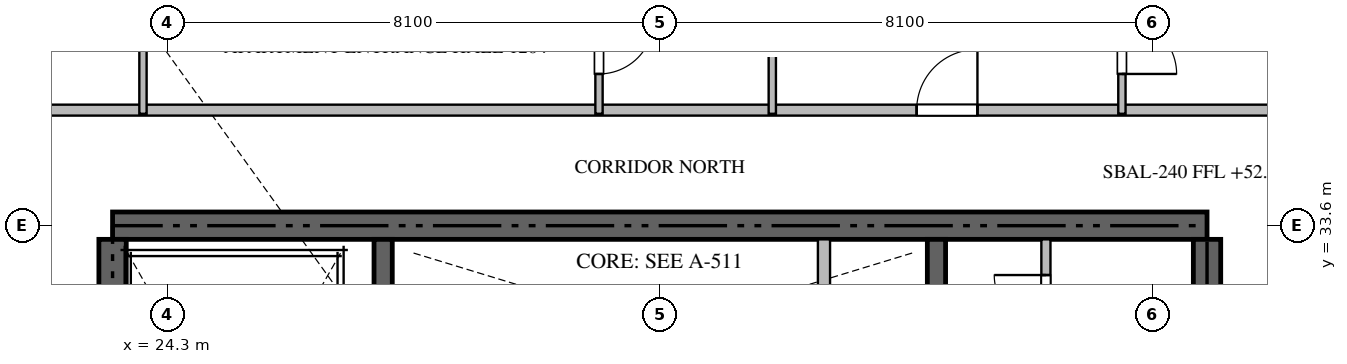
"""IFC4 building model, lengths in metres.
Left out: names, types, materials, properties, quantities, classifications, styles, units other than length and angle.
Written with IfcOpenShell. Run it as: python <this file> out.ifc"""

import sys

from ifc_helpers import new_model, si_unit, direction, frame, frame_2d, origin, place, context, subcontext, project, spatial, rectangle, extrude, source, transform, mapped, element, fill, save


model = new_model("IFC4")
c1 = context("Model", 3, precision=1e-05, world=origin(), true_north=direction((0.0, 1.0)))
c2 = subcontext(c1, "Body", "Model", "MODEL_VIEW")
j1 = project(units=[si_unit("LENGTHUNIT", "METRE"), si_unit("PLANEANGLEUNIT", "RADIAN")], contexts=[c1])
p1 = place(None, origin())
s1 = spatial("IfcSite", under=j1, at=p1, CompositionType="ELEMENT")
p2 = place(p1, origin())
s2 = spatial("IfcBuilding", under=s1, at=p2, CompositionType="ELEMENT")
p3 = place(p2, frame((0.0, 0.0, 52.95)))
s3 = spatial("IfcBuildingStorey", under=s2, at=p3, CompositionType="ELEMENT", Elevation=52.95)
p4 = place(p3, frame((41.4, 33.6, -0.26), z_axis=(0.0, 0.0, 1.0), x_axis=(-1.0, 0.0, 0.0)))
e1 = element("IfcWall", 1, at=p4, inside=s3, PredefinedType="SHEAR", context=c2, shape_type="SweptSolid", body=[
    extrude(rectangle(XDim=18.0, YDim=0.45, at=frame_2d((9.0, 0.0))), origin(), (0.0, 0.0, 1.0), 3.748),
])
p5 = place(p3, frame((23.4, 24.25, -0.26), z_axis=(0.0, 0.0, 1.0), x_axis=(0.0, 1.0, 0.0)))
e2 = element("IfcWall", 2, at=p5, inside=s3, PredefinedType="SHEAR", context=c2, shape_type="SweptSolid", body=[
    extrude(rectangle(XDim=9.125, YDim=0.45, at=frame_2d((4.562, 0.0))), origin(), (0.0, 0.0, 1.0), 3.748),
])
p6 = place(p3, frame((41.4, 27.75, -0.26), z_axis=(0.0, 0.0, 1.0), x_axis=(0.0, 1.0, 0.0)))
e3 = element("IfcWall", 3, at=p6, inside=s3, PredefinedType="SHEAR", context=c2, shape_type="SweptSolid", body=[
    extrude(rectangle(XDim=5.625, YDim=0.45, at=frame_2d((2.812, 0.0))), origin(), (0.0, 0.0, 1.0), 3.748),
])
p7 = place(p3, frame((27.85, 23.55, -0.26), z_axis=(0.0, 0.0, 1.0), x_axis=(0.0, 1.0, 0.0)))
e4 = element("IfcWall", 4, at=p7, inside=s3, PredefinedType="SHEAR", context=c2, shape_type="SweptSolid", body=[
    extrude(rectangle(XDim=9.825, YDim=0.3, at=frame_2d((4.913, 0.0))), origin(), (0.0, 0.0, 1.0), 3.748),
])
p8 = place(p3, frame((36.95, 27.05, -0.26), z_axis=(0.0, 0.0, 1.0), x_axis=(0.0, 1.0, 0.0)))
e5 = element("IfcWall", 5, at=p8, inside=s3, PredefinedType="SHEAR", context=c2, shape_type="SweptSolid", body=[
    extrude(rectangle(XDim=6.325, YDim=0.3, at=frame_2d((3.163, 0.0))), origin(), (0.0, 0.0, 1.0), 3.748),
])
p9 = place(p3, frame((35.1, 30.75, 0.0), z_axis=(0.0, 0.0, 1.0), x_axis=(0.0, 1.0, 0.0)))
e6 = element("IfcWall", 6, at=p9, inside=s3, PredefinedType="STANDARD", context=c2, shape_type="SweptSolid", body=[
    extrude(rectangle(XDim=2.625, YDim=0.2, at=frame_2d((1.312, 0.0))), origin(), (0.0, 0.0, 1.0), 3.49),
])
p10 = place(p3, frame((38.75, 31.352, 0.0), z_axis=(0.0, 0.0, 1.0), x_axis=(0.0, 1.0, 0.0)))
e7 = element("IfcWall", 7, at=p10, inside=s3, PredefinedType="PARTITIONING", context=c2, shape_type="SweptSolid", body=[
    extrude(rectangle(XDim=2.023, YDim=0.15, at=frame_2d((1.011, 0.0))), origin(), (0.0, 0.0, 1.0), 3.49),
])
p11 = place(p10, frame((0.586, 0.0, 0.0)))
e8 = element("IfcOpeningElement", 8, at=p11, cuts=e7, PredefinedType="OPENING", context=c2, shape_type="SweptSolid", body=[
    extrude(rectangle(XDim=0.85, YDim=2.1, at=frame_2d((0.425, 1.05))), frame((0.0, 0.085, 0.0), z_axis=(0.0, -1.0, 0.0), x_axis=(1.0, 0.0, 0.0)), (0.0, 0.0, 1.0), 0.17),
])
p12 = place(p3, frame((21.402, 35.5, 0.0), z_axis=(0.0, 0.0, 1.0), x_axis=(1.0, 0.0, 0.0)))
e9 = element("IfcWall", 9, at=p12, inside=s3, PredefinedType="PARTITIONING", context=c2, shape_type="SweptSolid", body=[
    extrude(rectangle(XDim=21.996, YDim=0.18, at=frame_2d((10.998, 0.0))), origin(), (0.0, 0.0, 1.0), 3.49),
])
p13 = place(p12, frame((15.222, 0.0, 0.0)))
e10 = element("IfcOpeningElement", 10, at=p13, cuts=e9, PredefinedType="OPENING", context=c2, shape_type="SweptSolid", body=[
    extrude(rectangle(XDim=1.0, YDim=2.15, at=frame_2d((0.5, 1.075))), frame((0.0, 0.1, 0.0), z_axis=(0.0, -1.0, 0.0), x_axis=(1.0, 0.0, 0.0)), (0.0, 0.0, 1.0), 0.2),
])
p14 = place(p3, frame((34.25, 38.25, 0.0), z_axis=(0.0, 0.0, 1.0), x_axis=(0.0, -1.0, 0.0)))
e11 = element("IfcWall", 11, at=p14, inside=s3, PredefinedType="PARTITIONING", context=c2, shape_type="SweptSolid", body=[
    extrude(rectangle(XDim=2.81, YDim=0.12, at=frame_2d((1.405, 0.0))), origin(), (0.0, 0.0, 1.0), 3.49),
])
p15 = place(p3, frame((31.4, 37.65, 0.0), z_axis=(0.0, 0.0, 1.0), x_axis=(0.0, -1.0, 0.0)))
e12 = element("IfcWall", 12, at=p15, inside=s3, PredefinedType="PARTITIONING", context=c2, shape_type="SweptSolid", body=[
    extrude(rectangle(XDim=2.21, YDim=0.12, at=frame_2d((1.105, 0.0))), origin(), (0.0, 0.0, 1.0), 3.49),
])
p16 = place(p15, frame((0.655, 0.0, 0.0)))
e13 = element("IfcOpeningElement", 13, at=p16, cuts=e12, PredefinedType="OPENING", context=c2, shape_type="SweptSolid", body=[
    extrude(rectangle(XDim=0.9, YDim=2.1, at=frame_2d((0.45, 1.05))), frame((0.0, 0.07, 0.0), z_axis=(0.0, -1.0, 0.0), x_axis=(1.0, 0.0, 0.0)), (0.0, 0.0, 1.0), 0.14),
])
p17 = place(p3, frame((23.9, 37.648, 0.0), z_axis=(0.0, 0.0, 1.0), x_axis=(0.0, -1.0, 0.0)))
e14 = element("IfcWall", 14, at=p17, inside=s3, PredefinedType="PARTITIONING", context=c2, shape_type="SweptSolid", body=[
    extrude(rectangle(XDim=2.208, YDim=0.12, at=frame_2d((1.104, 0.0))), origin(), (0.0, 0.0, 1.0), 3.49),
])
p18 = place(p3, frame((40.0, 37.65, 0.0), z_axis=(0.0, 0.0, 1.0), x_axis=(0.0, -1.0, 0.0)))
e15 = element("IfcWall", 15, at=p18, inside=s3, PredefinedType="PARTITIONING", context=c2, shape_type="SweptSolid", body=[
    extrude(rectangle(XDim=2.21, YDim=0.12, at=frame_2d((1.105, 0.0))), origin(), (0.0, 0.0, 1.0), 3.49),
])
p19 = place(p18, frame((0.655, 0.0, 0.0)))
e16 = element("IfcOpeningElement", 16, at=p19, cuts=e15, PredefinedType="OPENING", context=c2, shape_type="SweptSolid", body=[
    extrude(rectangle(XDim=0.9, YDim=2.1, at=frame_2d((0.45, 1.05))), frame((0.0, 0.07, 0.0), z_axis=(0.0, -1.0, 0.0), x_axis=(1.0, 0.0, 0.0)), (0.0, 0.0, 1.0), 0.14),
])
m1 = source(origin(), c2, "Body", "SweptSolid", [
    extrude(rectangle(XDim=0.85, YDim=2.1, at=frame_2d((0.425, 1.05))), frame((0.0, 0.025, 0.0), z_axis=(0.0, -1.0, 0.0), x_axis=(1.0, 0.0, 0.0)), (0.0, 0.0, 1.0), 0.05),
])
p20 = place(p11, origin())
e17 = element("IfcDoor", 17, at=p20, inside=s3, OperationType="SINGLE_SWING_RIGHT", PredefinedType="DOOR", context=c2, shape_type="MappedRepresentation", body=[
    mapped(m1, transform((0.0, 0.0, 0.0), scale=1.0)),
])
fill(e8, e17)
m2 = source(origin(), c2, "Body", "SweptSolid", [
    extrude(rectangle(XDim=1.0, YDim=2.15, at=frame_2d((0.5, 1.075))), frame((0.0, 0.025, 0.0), z_axis=(0.0, -1.0, 0.0), x_axis=(1.0, 0.0, 0.0)), (0.0, 0.0, 1.0), 0.05),
])
p21 = place(p13, origin())
e18 = element("IfcDoor", 18, at=p21, inside=s3, OperationType="SINGLE_SWING_RIGHT", PredefinedType="DOOR", context=c2, shape_type="MappedRepresentation", body=[
    mapped(m2, transform((0.0, 0.0, 0.0), scale=1.0)),
])
fill(e10, e18)
m3 = source(origin(), c2, "Body", "SweptSolid", [
    extrude(rectangle(XDim=0.9, YDim=2.1, at=frame_2d((0.45, 1.05))), frame((0.0, 0.025, 0.0), z_axis=(0.0, -1.0, 0.0), x_axis=(1.0, 0.0, 0.0)), (0.0, 0.0, 1.0), 0.05),
])
p22 = place(p16, origin())
e19 = element("IfcDoor", 19, at=p22, inside=s3, OperationType="SINGLE_SWING_LEFT", PredefinedType="DOOR", context=c2, shape_type="MappedRepresentation", body=[
    mapped(m3, transform((0.0, 0.0, 0.0), scale=1.0)),
])
fill(e13, e19)
p23 = place(p19, origin())
e20 = element("IfcDoor", 20, at=p23, inside=s3, OperationType="SINGLE_SWING_RIGHT", PredefinedType="DOOR", context=c2, shape_type="MappedRepresentation", body=[
    mapped(m3, transform((0.0, 0.0, 0.0), scale=1.0)),
])
fill(e16, e20)
save(model, sys.argv[1])
